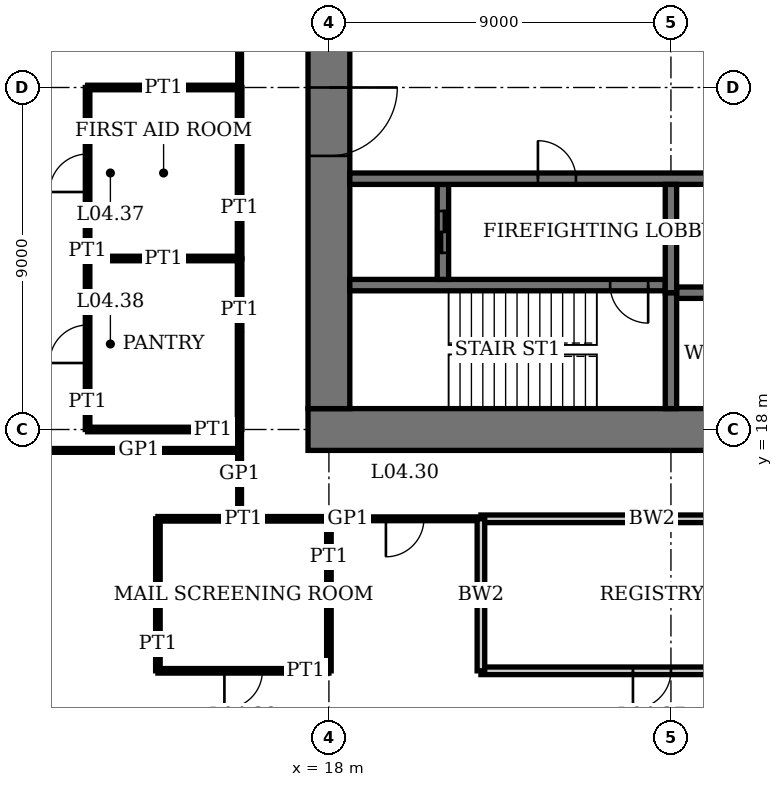
"""IFC4 building model, lengths in metres.
Left out: names, types, materials, properties, quantities, classifications, styles, units other than length and angle.
Written with IfcOpenShell. Run it as: python <this file> out.ifc"""

import sys

from ifc_helpers import new_model, si_unit, direction, frame, frame_2d, origin, place, context, subcontext, project, spatial, rectangle, extrude, element, fill, save


model = new_model("IFC4")
c1 = context("Model", 3, precision=1e-05, world=origin(), true_north=direction((0.0, 1.0)))
c2 = subcontext(c1, "Body", "Model", "MODEL_VIEW")
j1 = project(units=[si_unit("LENGTHUNIT", "METRE"), si_unit("PLANEANGLEUNIT", "RADIAN")], contexts=[c1])
p1 = place(None, origin())
s1 = spatial("IfcSite", under=j1, at=p1, CompositionType="ELEMENT")
p2 = place(p1, origin())
s2 = spatial("IfcBuilding", under=s1, at=p2, CompositionType="ELEMENT")
p3 = place(p2, frame((0.0, 0.0, 19.8)))
s3 = spatial("IfcBuildingStorey", under=s2, at=p3, CompositionType="ELEMENT", Elevation=19.8)
p4 = place(p3, frame((17.45, 18.0, 0.0), z_axis=(0.0, 0.0, 1.0), x_axis=(1.0, 0.0, 0.0)))
e1 = element("IfcWall", 1, at=p4, inside=s3, PredefinedType="SHEAR", context=c2, shape_type="SweptSolid", body=[
    extrude(rectangle(XDim=28.1, YDim=1.1, at=frame_2d((14.05, 0.0))), origin(), (0.0, 0.0, 1.0), 4.0),
])
p5 = place(p4, frame((11.55, 0.0, 0.0)))
e2 = element("IfcOpeningElement", 2, at=p5, cuts=e1, PredefinedType="OPENING", context=c2, shape_type="SweptSolid", body=[
    extrude(rectangle(XDim=1.0, YDim=2.4, at=frame_2d((0.5, 1.2))), frame((0.0, 0.56, 0.0), z_axis=(0.0, -1.0, 0.0), x_axis=(1.0, 0.0, 0.0)), (0.0, 0.0, 1.0), 1.12),
])
p6 = place(p4, frame((16.55, 0.0, 0.0)))
e3 = element("IfcOpeningElement", 3, at=p6, cuts=e1, PredefinedType="OPENING", context=c2, shape_type="SweptSolid", body=[
    extrude(rectangle(XDim=1.0, YDim=2.4, at=frame_2d((0.5, 1.2))), frame((0.0, 0.56, 0.0), z_axis=(0.0, -1.0, 0.0), x_axis=(1.0, 0.0, 0.0)), (0.0, 0.0, 1.0), 1.12),
])
p7 = place(p4, frame((20.0, 0.0, 0.0)))
e4 = element("IfcOpeningElement", 4, at=p7, cuts=e1, PredefinedType="OPENING", context=c2, shape_type="SweptSolid", body=[
    extrude(rectangle(XDim=1.1, YDim=2.4, at=frame_2d((0.55, 1.2))), frame((0.0, 0.56, 0.0), z_axis=(0.0, -1.0, 0.0), x_axis=(1.0, 0.0, 0.0)), (0.0, 0.0, 1.0), 1.12),
])
p8 = place(p4, frame((24.05, 0.0, 0.0)))
e5 = element("IfcOpeningElement", 5, at=p8, cuts=e1, PredefinedType="OPENING", context=c2, shape_type="SweptSolid", body=[
    extrude(rectangle(XDim=1.0, YDim=2.4, at=frame_2d((0.5, 1.2))), frame((0.0, 0.56, 0.0), z_axis=(0.0, -1.0, 0.0), x_axis=(1.0, 0.0, 0.0)), (0.0, 0.0, 1.0), 1.12),
])
p9 = place(p3, frame((18.0, 35.45, 0.0), z_axis=(0.0, 0.0, 1.0), x_axis=(0.0, -1.0, 0.0)))
e6 = element("IfcWall", 6, at=p9, inside=s3, PredefinedType="SHEAR", context=c2, shape_type="SweptSolid", body=[
    extrude(rectangle(XDim=16.9, YDim=1.1, at=frame_2d((8.45, 0.0))), origin(), (0.0, 0.0, 1.0), 4.0),
])
p10 = place(p9, frame((8.45, 0.0, 0.0)))
e7 = element("IfcOpeningElement", 7, at=p10, cuts=e6, PredefinedType="OPENING", context=c2, shape_type="SweptSolid", body=[
    extrude(rectangle(XDim=1.8, YDim=2.4, at=frame_2d((0.9, 1.2))), frame((0.0, 0.56, 0.0), z_axis=(0.0, -1.0, 0.0), x_axis=(1.0, 0.0, 0.0)), (0.0, 0.0, 1.0), 1.12),
])
p11 = place(p3, frame((18.55, 21.8, 0.0), z_axis=(0.0, 0.0, 1.0), x_axis=(1.0, 0.0, 0.0)))
e8 = element("IfcWall", 8, at=p11, inside=s3, PredefinedType="SHEAR", context=c2, shape_type="SweptSolid", body=[
    extrude(rectangle(XDim=8.3, YDim=0.3, at=frame_2d((4.15, 0.0))), origin(), (0.0, 0.0, 1.0), 4.0),
])
p12 = place(p11, frame((6.85, 0.0, 0.0)))
e9 = element("IfcOpeningElement", 9, at=p12, cuts=e8, PredefinedType="OPENING", context=c2, shape_type="SweptSolid", body=[
    extrude(rectangle(XDim=1.0, YDim=2.4, at=frame_2d((0.5, 1.2))), frame((0.0, 0.16, 0.0), z_axis=(0.0, -1.0, 0.0), x_axis=(1.0, 0.0, 0.0)), (0.0, 0.0, 1.0), 0.32),
])
p13 = place(p3, frame((27.0, 18.55, 0.0), z_axis=(0.0, 0.0, 1.0), x_axis=(0.0, 1.0, 0.0)))
e10 = element("IfcWall", 10, at=p13, inside=s3, PredefinedType="SHEAR", context=c2, shape_type="SweptSolid", body=[
    extrude(rectangle(XDim=3.05, YDim=0.3, at=frame_2d((1.525, 0.0))), origin(), (0.0, 0.0, 1.0), 4.0),
])
p14 = place(p3, frame((21.0, 21.95, 0.0), z_axis=(0.0, 0.0, 1.0), x_axis=(0.0, 1.0, 0.0)))
e11 = element("IfcWall", 11, at=p14, inside=s3, PredefinedType="SHEAR", context=c2, shape_type="SweptSolid", body=[
    extrude(rectangle(XDim=2.5, YDim=0.3, at=frame_2d((1.25, 0.0))), origin(), (0.0, 0.0, 1.0), 4.0),
])
p15 = place(p14, frame((0.7, 0.0, 0.0)))
e12 = element("IfcOpeningElement", 12, at=p15, cuts=e11, PredefinedType="OPENING", context=c2, shape_type="SweptSolid", body=[
    extrude(rectangle(XDim=1.1, YDim=2.4, at=frame_2d((0.55, 1.2))), frame((0.0, 0.16, 0.0), z_axis=(0.0, -1.0, 0.0), x_axis=(1.0, 0.0, 0.0)), (0.0, 0.0, 1.0), 0.32),
])
p16 = place(p3, frame((18.55, 24.6, 0.0), z_axis=(0.0, 0.0, 1.0), x_axis=(1.0, 0.0, 0.0)))
e13 = element("IfcWall", 13, at=p16, inside=s3, PredefinedType="SHEAR", context=c2, shape_type="SweptSolid", body=[
    extrude(rectangle(XDim=25.9, YDim=0.3, at=frame_2d((12.95, 0.0))), origin(), (0.0, 0.0, 1.0), 4.0),
])
p17 = place(p16, frame((4.95, 0.0, 0.0)))
e14 = element("IfcOpeningElement", 14, at=p17, cuts=e13, PredefinedType="OPENING", context=c2, shape_type="SweptSolid", body=[
    extrude(rectangle(XDim=1.0, YDim=2.4, at=frame_2d((0.5, 1.2))), frame((0.0, 0.16, 0.0), z_axis=(0.0, -1.0, 0.0), x_axis=(1.0, 0.0, 0.0)), (0.0, 0.0, 1.0), 0.32),
])
p18 = place(p16, frame((24.5, 0.0, 0.0)))
e15 = element("IfcOpeningElement", 15, at=p18, cuts=e13, PredefinedType="OPENING", context=c2, shape_type="SweptSolid", body=[
    extrude(rectangle(XDim=0.9, YDim=2.1, at=frame_2d((0.45, 1.05))), frame((0.0, 0.16, 0.0), z_axis=(0.0, -1.0, 0.0), x_axis=(1.0, 0.0, 0.0)), (0.0, 0.0, 1.0), 0.32),
])
p19 = place(p16, frame((9.4, 0.0, 0.0)))
e16 = element("IfcOpeningElement", 16, at=p19, cuts=e13, PredefinedType="OPENING", context=c2, shape_type="SweptSolid", body=[
    extrude(rectangle(XDim=1.1, YDim=2.4, at=frame_2d((0.55, 1.2))), frame((0.0, 0.16, 0.0), z_axis=(0.0, -1.0, 0.0), x_axis=(1.0, 0.0, 0.0)), (0.0, 0.0, 1.0), 0.32),
])
p20 = place(p16, frame((12.4, 0.0, 0.0)))
e17 = element("IfcOpeningElement", 17, at=p20, cuts=e13, PredefinedType="OPENING", context=c2, shape_type="SweptSolid", body=[
    extrude(rectangle(XDim=1.1, YDim=2.4, at=frame_2d((0.55, 1.2))), frame((0.0, 0.16, 0.0), z_axis=(0.0, -1.0, 0.0), x_axis=(1.0, 0.0, 0.0)), (0.0, 0.0, 1.0), 0.32),
])
p21 = place(p16, frame((15.4, 0.0, 0.0)))
e18 = element("IfcOpeningElement", 18, at=p21, cuts=e13, PredefinedType="OPENING", context=c2, shape_type="SweptSolid", body=[
    extrude(rectangle(XDim=1.1, YDim=2.4, at=frame_2d((0.55, 1.2))), frame((0.0, 0.16, 0.0), z_axis=(0.0, -1.0, 0.0), x_axis=(1.0, 0.0, 0.0)), (0.0, 0.0, 1.0), 0.32),
])
p22 = place(p16, frame((18.4, 0.0, 0.0)))
e19 = element("IfcOpeningElement", 19, at=p22, cuts=e13, PredefinedType="OPENING", context=c2, shape_type="SweptSolid", body=[
    extrude(rectangle(XDim=1.1, YDim=2.4, at=frame_2d((0.55, 1.2))), frame((0.0, 0.16, 0.0), z_axis=(0.0, -1.0, 0.0), x_axis=(1.0, 0.0, 0.0)), (0.0, 0.0, 1.0), 0.32),
])
p23 = place(p16, frame((21.3, 0.0, 0.0)))
e20 = element("IfcOpeningElement", 20, at=p23, cuts=e13, PredefinedType="OPENING", context=c2, shape_type="SweptSolid", body=[
    extrude(rectangle(XDim=1.3, YDim=2.4, at=frame_2d((0.65, 1.2))), frame((0.0, 0.16, 0.0), z_axis=(0.0, -1.0, 0.0), x_axis=(1.0, 0.0, 0.0)), (0.0, 0.0, 1.0), 0.32),
])
p24 = place(p3, frame((27.15, 21.6, 0.0), z_axis=(0.0, 0.0, 1.0), x_axis=(1.0, 0.0, 0.0)))
e21 = element("IfcWall", 21, at=p24, inside=s3, PredefinedType="SHEAR", context=c2, shape_type="SweptSolid", body=[
    extrude(rectangle(XDim=17.3, YDim=0.3, at=frame_2d((8.65, 0.0))), origin(), (0.0, 0.0, 1.0), 4.0),
])
p25 = place(p3, frame((27.0, 21.6, 0.0), z_axis=(0.0, 0.0, 1.0), x_axis=(0.0, 1.0, 0.0)))
e22 = element("IfcWall", 22, at=p25, inside=s3, PredefinedType="SHEAR", context=c2, shape_type="SweptSolid", body=[
    extrude(rectangle(XDim=2.85, YDim=0.3, at=frame_2d((1.425, 0.0))), origin(), (0.0, 0.0, 1.0), 4.0),
])
p26 = place(p3, frame((22.0, 11.65, 0.0), z_axis=(0.0, 0.0, 1.0), x_axis=(1.0, 0.0, 0.0)))
e23 = element("IfcWall", 23, at=p26, inside=s3, PredefinedType="SOLIDWALL", context=c2, shape_type="SweptSolid", body=[
    extrude(rectangle(XDim=9.0, YDim=0.2, at=frame_2d((4.5, 0.0))), origin(), (0.0, 0.0, 1.0), 3.75),
])
p27 = place(p26, frame((4.0, 0.0, 0.0)))
e24 = element("IfcOpeningElement", 24, at=p27, cuts=e23, PredefinedType="OPENING", context=c2, shape_type="SweptSolid", body=[
    extrude(rectangle(XDim=1.0, YDim=2.4, at=frame_2d((0.5, 1.2))), frame((0.0, 0.11, 0.0), z_axis=(0.0, -1.0, 0.0), x_axis=(1.0, 0.0, 0.0)), (0.0, 0.0, 1.0), 0.22),
])
p28 = place(p3, frame((13.5, 11.65, 0.0), z_axis=(0.0, 0.0, 1.0), x_axis=(1.0, 0.0, 0.0)))
e25 = element("IfcWall", 25, at=p28, inside=s3, PredefinedType="PARTITIONING", context=c2, shape_type="SweptSolid", body=[
    extrude(rectangle(XDim=4.5, YDim=0.12, at=frame_2d((2.25, 0.0))), origin(), (0.0, 0.0, 1.0), 3.75),
])
p29 = place(p28, frame((1.75, 0.0, 0.0)))
e26 = element("IfcOpeningElement", 26, at=p29, cuts=e25, PredefinedType="OPENING", context=c2, shape_type="SweptSolid", body=[
    extrude(rectangle(XDim=1.0, YDim=2.4, at=frame_2d((0.5, 1.2))), frame((0.0, 0.07, 0.0), z_axis=(0.0, -1.0, 0.0), x_axis=(1.0, 0.0, 0.0)), (0.0, 0.0, 1.0), 0.14),
])
p30 = place(p3, frame((22.0, 15.65, 0.0), z_axis=(0.0, 0.0, 1.0), x_axis=(1.0, 0.0, 0.0)))
e27 = element("IfcWall", 27, at=p30, inside=s3, PredefinedType="SOLIDWALL", context=c2, shape_type="SweptSolid", body=[
    extrude(rectangle(XDim=9.0, YDim=0.2, at=frame_2d((4.5, 0.0))), origin(), (0.0, 0.0, 1.0), 3.75),
])
p31 = place(p3, frame((13.5, 15.65, 0.0), z_axis=(0.0, 0.0, 1.0), x_axis=(1.0, 0.0, 0.0)))
e28 = element("IfcWall", 28, at=p31, inside=s3, PredefinedType="PARTITIONING", context=c2, shape_type="SweptSolid", body=[
    extrude(rectangle(XDim=4.5, YDim=0.12, at=frame_2d((2.25, 0.0))), origin(), (0.0, 0.0, 1.0), 3.75),
])
p32 = place(p3, frame((18.0, 15.65, 0.0), z_axis=(0.0, 0.0, 1.0), x_axis=(1.0, 0.0, 0.0)))
e29 = element("IfcWall", 29, at=p32, inside=s3, PredefinedType="PARTITIONING", context=c2, shape_type="SweptSolid", body=[
    extrude(rectangle(XDim=4.0, YDim=0.1, at=frame_2d((2.0, 0.0))), origin(), (0.0, 0.0, 1.0), 3.75),
])
p33 = place(p32, frame((1.5, 0.0, 0.0)))
e30 = element("IfcOpeningElement", 30, at=p33, cuts=e29, PredefinedType="OPENING", context=c2, shape_type="SweptSolid", body=[
    extrude(rectangle(XDim=1.0, YDim=2.4, at=frame_2d((0.5, 1.2))), frame((0.0, 0.06, 0.0), z_axis=(0.0, -1.0, 0.0), x_axis=(1.0, 0.0, 0.0)), (0.0, 0.0, 1.0), 0.12),
])
p34 = place(p3, frame((10.15, 17.45, 0.0), z_axis=(0.0, 0.0, 1.0), x_axis=(1.0, 0.0, 0.0)))
e31 = element("IfcWall", 31, at=p34, inside=s3, PredefinedType="PARTITIONING", context=c2, shape_type="SweptSolid", body=[
    extrude(rectangle(XDim=5.5, YDim=0.1, at=frame_2d((2.75, 0.0))), origin(), (0.0, 0.0, 1.0), 3.75),
])
p35 = place(p3, frame((11.65, 18.0, 0.0), z_axis=(0.0, 0.0, 1.0), x_axis=(1.0, 0.0, 0.0)))
e32 = element("IfcWall", 32, at=p35, inside=s3, PredefinedType="PARTITIONING", context=c2, shape_type="SweptSolid", body=[
    extrude(rectangle(XDim=4.0, YDim=0.12, at=frame_2d((2.0, 0.0))), origin(), (0.0, 0.0, 1.0), 3.05),
])
p36 = place(p3, frame((11.65, 22.5, 0.0), z_axis=(0.0, 0.0, 1.0), x_axis=(1.0, 0.0, 0.0)))
e33 = element("IfcWall", 33, at=p36, inside=s3, PredefinedType="PARTITIONING", context=c2, shape_type="SweptSolid", body=[
    extrude(rectangle(XDim=4.0, YDim=0.12, at=frame_2d((2.0, 0.0))), origin(), (0.0, 0.0, 1.0), 3.1),
])
p37 = place(p3, frame((11.65, 27.0, 0.0), z_axis=(0.0, 0.0, 1.0), x_axis=(1.0, 0.0, 0.0)))
e34 = element("IfcWall", 34, at=p37, inside=s3, PredefinedType="PARTITIONING", context=c2, shape_type="SweptSolid", body=[
    extrude(rectangle(XDim=4.0, YDim=0.12, at=frame_2d((2.0, 0.0))), origin(), (0.0, 0.0, 1.0), 3.05),
])
p38 = place(p3, frame((11.65, 22.5, 0.0), z_axis=(0.0, 0.0, 1.0), x_axis=(0.0, 1.0, 0.0)))
e35 = element("IfcWall", 35, at=p38, inside=s3, PredefinedType="PARTITIONING", context=c2, shape_type="SweptSolid", body=[
    extrude(rectangle(XDim=4.5, YDim=0.12, at=frame_2d((2.25, 0.0))), origin(), (0.0, 0.0, 1.0), 3.75),
])
p39 = place(p38, frame((1.75, 0.0, 0.0)))
e36 = element("IfcOpeningElement", 36, at=p39, cuts=e35, PredefinedType="OPENING", context=c2, shape_type="SweptSolid", body=[
    extrude(rectangle(XDim=1.0, YDim=2.4, at=frame_2d((0.5, 1.2))), frame((0.0, 0.07, 0.0), z_axis=(0.0, -1.0, 0.0), x_axis=(1.0, 0.0, 0.0)), (0.0, 0.0, 1.0), 0.14),
])
p40 = place(p3, frame((11.65, 18.0, 0.0), z_axis=(0.0, 0.0, 1.0), x_axis=(0.0, 1.0, 0.0)))
e37 = element("IfcWall", 37, at=p40, inside=s3, PredefinedType="PARTITIONING", context=c2, shape_type="SweptSolid", body=[
    extrude(rectangle(XDim=4.5, YDim=0.12, at=frame_2d((2.25, 0.0))), origin(), (0.0, 0.0, 1.0), 3.75),
])
p41 = place(p40, frame((1.75, 0.0, 0.0)))
e38 = element("IfcOpeningElement", 38, at=p41, cuts=e37, PredefinedType="OPENING", context=c2, shape_type="SweptSolid", body=[
    extrude(rectangle(XDim=1.0, YDim=2.4, at=frame_2d((0.5, 1.2))), frame((0.0, 0.07, 0.0), z_axis=(0.0, -1.0, 0.0), x_axis=(1.0, 0.0, 0.0)), (0.0, 0.0, 1.0), 0.14),
])
p42 = place(p3, frame((13.5, 11.65, 0.0), z_axis=(0.0, 0.0, 1.0), x_axis=(0.0, 1.0, 0.0)))
e39 = element("IfcWall", 39, at=p42, inside=s3, PredefinedType="PARTITIONING", context=c2, shape_type="SweptSolid", body=[
    extrude(rectangle(XDim=4.0, YDim=0.12, at=frame_2d((2.0, 0.0))), origin(), (0.0, 0.0, 1.0), 3.75),
])
for number, where, z_axis, x_axis in (
    (40, (15.65, 22.5, 0.0), (0.0, 0.0, 1.0), (0.0, 1.0, 0.0)),
    (41, (15.65, 18.0, 0.0), (0.0, 0.0, 1.0), (0.0, 1.0, 0.0)),
):
    element("IfcWall", number, at=place(p3, frame(where, z_axis=z_axis, x_axis=x_axis)), inside=s3, PredefinedType="PARTITIONING", context=c2, shape_type="SweptSolid", body=[
        extrude(rectangle(XDim=4.5, YDim=0.12, at=frame_2d((2.25, 0.0))), origin(), (0.0, 0.0, 1.0), 3.75),
    ])
p43 = place(p3, frame((15.65, 15.65, 0.0), z_axis=(0.0, 0.0, 1.0), x_axis=(0.0, 1.0, 0.0)))
e42 = element("IfcWall", 42, at=p43, inside=s3, PredefinedType="PARTITIONING", context=c2, shape_type="SweptSolid", body=[
    extrude(rectangle(XDim=2.35, YDim=0.1, at=frame_2d((1.175, 0.0))), origin(), (0.0, 0.0, 1.0), 3.75),
])
p44 = place(p3, frame((15.65, 27.0, 0.0), z_axis=(0.0, 0.0, 1.0), x_axis=(0.0, 1.0, 0.0)))
e43 = element("IfcWall", 43, at=p44, inside=s3, PredefinedType="PARTITIONING", context=c2, shape_type="SweptSolid", body=[
    extrude(rectangle(XDim=11.35, YDim=0.1, at=frame_2d((5.675, 0.0))), origin(), (0.0, 0.0, 1.0), 3.75),
])
p45 = place(p44, frame((5.175, 0.0, 0.0)))
e44 = element("IfcOpeningElement", 44, at=p45, cuts=e43, PredefinedType="OPENING", context=c2, shape_type="SweptSolid", body=[
    extrude(rectangle(XDim=1.0, YDim=2.4, at=frame_2d((0.5, 1.2))), frame((0.0, 0.06, 0.0), z_axis=(0.0, -1.0, 0.0), x_axis=(1.0, 0.0, 0.0)), (0.0, 0.0, 1.0), 0.12),
])
p46 = place(p3, frame((18.0, 11.65, 0.0), z_axis=(0.0, 0.0, 1.0), x_axis=(0.0, 1.0, 0.0)))
e45 = element("IfcWall", 45, at=p46, inside=s3, PredefinedType="PARTITIONING", context=c2, shape_type="SweptSolid", body=[
    extrude(rectangle(XDim=4.0, YDim=0.12, at=frame_2d((2.0, 0.0))), origin(), (0.0, 0.0, 1.0), 3.05),
])
p47 = place(p3, frame((22.0, 11.65, 0.0), z_axis=(0.0, 0.0, 1.0), x_axis=(0.0, 1.0, 0.0)))
e46 = element("IfcWall", 46, at=p47, inside=s3, PredefinedType="SOLIDWALL", context=c2, shape_type="SweptSolid", body=[
    extrude(rectangle(XDim=4.0, YDim=0.2, at=frame_2d((2.0, 0.0))), origin(), (0.0, 0.0, 1.0), 3.75),
])
p48 = place(p10, origin())
e47 = element("IfcDoor", 47, at=p48, inside=s3, OperationType="DOUBLE_DOOR_DOUBLE_SWING", PredefinedType="DOOR", context=c2, shape_type="SweptSolid", body=[
    extrude(rectangle(XDim=1.8, YDim=2.4, at=frame_2d((0.9, 1.2))), frame((0.0, 0.03, 0.0), z_axis=(0.0, -1.0, 0.0), x_axis=(1.0, 0.0, 0.0)), (0.0, 0.0, 1.0), 0.06),
    extrude(rectangle(XDim=0.04, YDim=2.4, at=frame_2d((0.02, 1.2))), frame((0.0, 0.55, 0.0), z_axis=(0.0, -1.0, 0.0), x_axis=(1.0, 0.0, 0.0)), (0.0, 0.0, 1.0), 1.1),
    extrude(rectangle(XDim=0.04, YDim=2.4, at=frame_2d((1.78, 1.2))), frame((0.0, 0.55, 0.0), z_axis=(0.0, -1.0, 0.0), x_axis=(1.0, 0.0, 0.0)), (0.0, 0.0, 1.0), 1.1),
    extrude(rectangle(XDim=1.8, YDim=0.04, at=frame_2d((0.9, 2.38))), frame((0.0, 0.55, 0.0), z_axis=(0.0, -1.0, 0.0), x_axis=(1.0, 0.0, 0.0)), (0.0, 0.0, 1.0), 1.1),
])
fill(e7, e47)
p49 = place(p12, origin())
e48 = element("IfcDoor", 48, at=p49, inside=s3, OperationType="SINGLE_SWING_RIGHT", PredefinedType="DOOR", context=c2, shape_type="SweptSolid", body=[
    extrude(rectangle(XDim=1.0, YDim=2.4, at=frame_2d((0.5, 1.2))), frame((0.0, 0.03, 0.0), z_axis=(0.0, -1.0, 0.0), x_axis=(1.0, 0.0, 0.0)), (0.0, 0.0, 1.0), 0.06),
])
fill(e9, e48)
p50 = place(p17, origin())
e49 = element("IfcDoor", 49, at=p50, inside=s3, OperationType="SINGLE_SWING_RIGHT", PredefinedType="DOOR", context=c2, shape_type="SweptSolid", body=[
    extrude(rectangle(XDim=1.0, YDim=2.4, at=frame_2d((0.5, 1.2))), frame((0.0, 0.03, 0.0), z_axis=(0.0, -1.0, 0.0), x_axis=(1.0, 0.0, 0.0)), (0.0, 0.0, 1.0), 0.06),
])
fill(e14, e49)
p51 = place(p27, origin())
e50 = element("IfcDoor", 50, at=p51, inside=s3, OperationType="SINGLE_SWING_LEFT", PredefinedType="DOOR", context=c2, shape_type="SweptSolid", body=[
    extrude(rectangle(XDim=1.0, YDim=2.4, at=frame_2d((0.5, 1.2))), frame((0.0, 0.035, 0.0), z_axis=(0.0, -1.0, 0.0), x_axis=(1.0, 0.0, 0.0)), (0.0, 0.0, 1.0), 0.07),
])
fill(e24, e50)
p52 = place(p29, origin())
e51 = element("IfcDoor", 51, at=p52, inside=s3, OperationType="SINGLE_SWING_LEFT", PredefinedType="DOOR", context=c2, shape_type="SweptSolid", body=[
    extrude(rectangle(XDim=1.0, YDim=2.4, at=frame_2d((0.5, 1.2))), frame((0.0, 0.025, 0.0), z_axis=(0.0, -1.0, 0.0), x_axis=(1.0, 0.0, 0.0)), (0.0, 0.0, 1.0), 0.05),
])
fill(e26, e51)
p53 = place(p33, origin())
e52 = element("IfcDoor", 52, at=p53, inside=s3, OperationType="SINGLE_SWING_LEFT", PredefinedType="DOOR", context=c2, shape_type="SweptSolid", body=[
    extrude(rectangle(XDim=1.0, YDim=2.4, at=frame_2d((0.5, 1.2))), frame((0.0, 0.02, 0.0), z_axis=(0.0, -1.0, 0.0), x_axis=(1.0, 0.0, 0.0)), (0.0, 0.0, 1.0), 0.04),
])
fill(e30, e52)
p54 = place(p39, origin())
e53 = element("IfcDoor", 53, at=p54, inside=s3, OperationType="SINGLE_SWING_RIGHT", PredefinedType="DOOR", context=c2, shape_type="SweptSolid", body=[
    extrude(rectangle(XDim=1.0, YDim=2.4, at=frame_2d((0.5, 1.2))), frame((0.0, 0.025, 0.0), z_axis=(0.0, -1.0, 0.0), x_axis=(1.0, 0.0, 0.0)), (0.0, 0.0, 1.0), 0.05),
])
fill(e36, e53)
p55 = place(p41, origin())
e54 = element("IfcDoor", 54, at=p55, inside=s3, OperationType="SINGLE_SWING_RIGHT", PredefinedType="DOOR", context=c2, shape_type="SweptSolid", body=[
    extrude(rectangle(XDim=1.0, YDim=2.4, at=frame_2d((0.5, 1.2))), frame((0.0, 0.025, 0.0), z_axis=(0.0, -1.0, 0.0), x_axis=(1.0, 0.0, 0.0)), (0.0, 0.0, 1.0), 0.05),
])
fill(e38, e54)
p56 = place(p15, origin())
e55 = element("IfcDoor", 55, at=p56, inside=s3, OperationType="DOUBLE_DOOR_SLIDING", PredefinedType="DOOR", context=c2, shape_type="SweptSolid", body=[
    extrude(rectangle(XDim=1.1, YDim=2.4, at=frame_2d((0.55, 1.2))), frame((0.0, 0.03, 0.0), z_axis=(0.0, -1.0, 0.0), x_axis=(1.0, 0.0, 0.0)), (0.0, 0.0, 1.0), 0.06),
])
fill(e12, e55)
save(model, sys.argv[1])
